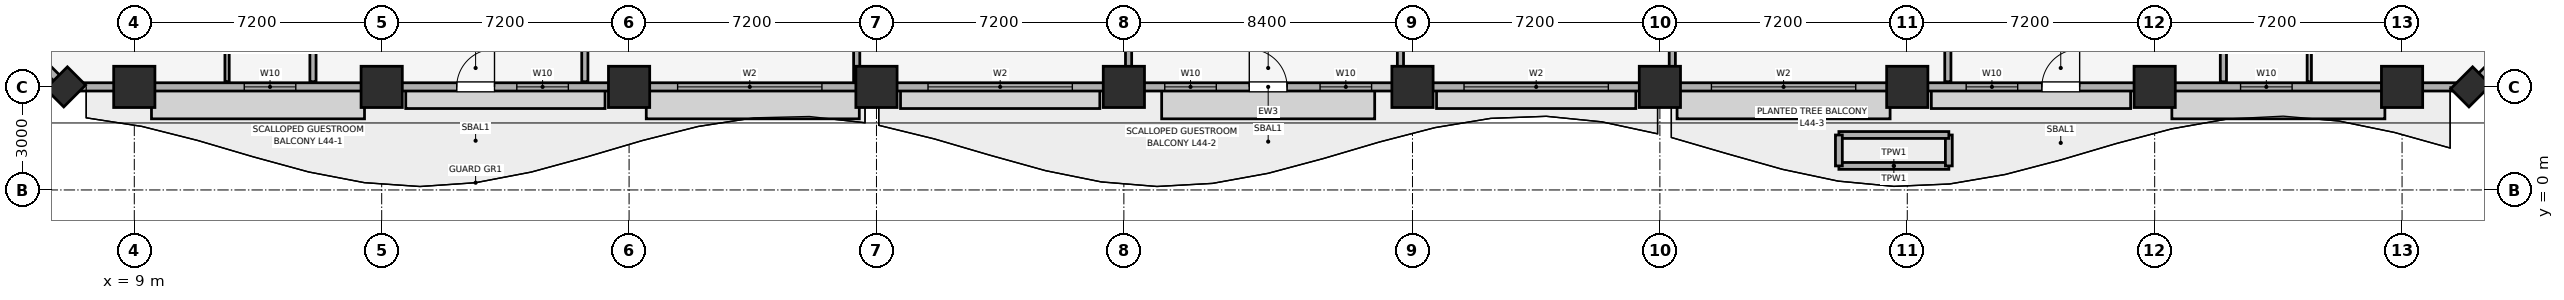
"""IFC4 building model, lengths in metres.
Left out: names, types, materials, properties, quantities, classifications, styles, units other than length and angle.
Written with IfcOpenShell. Run it as: python <this file> out.ifc"""

import sys

from ifc_helpers import new_model, si_unit, direction, frame, frame_2d, origin, origin_2d, place, context, subcontext, project, spatial, rectangle, extrude, element, fill, save


model = new_model("IFC4")
c1 = context("Model", 3, precision=1e-05, world=origin(), true_north=direction((0.0, 1.0)))
c2 = subcontext(c1, "Body", "Model", "MODEL_VIEW")
j1 = project(units=[si_unit("LENGTHUNIT", "METRE"), si_unit("PLANEANGLEUNIT", "RADIAN")], contexts=[c1])
p1 = place(None, origin())
s1 = spatial("IfcSite", under=j1, at=p1, CompositionType="ELEMENT")
p2 = place(p1, origin())
s2 = spatial("IfcBuilding", under=s1, at=p2, CompositionType="ELEMENT")
p3 = place(p2, frame((0.0, 0.0, 180.95)))
s3 = spatial("IfcBuildingStorey", under=s2, at=p3, CompositionType="ELEMENT", Elevation=180.95)
for number, where, z_axis, x_axis in (
    (1, (9.0, 3.0, 0.0), (0.0, 0.0, 1.0), (1.0, 0.0, 0.0)),
    (2, (16.2, 3.0, 0.0), (0.0, 0.0, 1.0), (1.0, 0.0, 0.0)),
    (3, (23.4, 3.0, 0.0), (0.0, 0.0, 1.0), (1.0, 0.0, 0.0)),
    (4, (30.6, 3.0, 0.0), (0.0, 0.0, 1.0), (1.0, 0.0, 0.0)),
    (5, (37.8, 3.0, 0.0), (0.0, 0.0, 1.0), (1.0, 0.0, 0.0)),
    (6, (46.2, 3.0, 0.0), (0.0, 0.0, 1.0), (1.0, 0.0, 0.0)),
    (7, (53.4, 3.0, 0.0), (0.0, 0.0, 1.0), (1.0, 0.0, 0.0)),
    (8, (60.6, 3.0, 0.0), (0.0, 0.0, 1.0), (1.0, 0.0, 0.0)),
    (9, (67.8, 3.0, 0.0), (0.0, 0.0, 1.0), (1.0, 0.0, 0.0)),
    (10, (75.0, 3.0, 0.0), (0.0, 0.0, 1.0), (1.0, 0.0, 0.0)),
):
    element("IfcColumn", number, at=place(p3, frame(where, z_axis=z_axis, x_axis=x_axis)), inside=s3, PredefinedType="COLUMN", context=c2, shape_type="SweptSolid", body=[
        extrude(rectangle(XDim=1.2, YDim=1.2, at=origin_2d()), origin(), (0.0, 0.0, 1.0), 3.45),
    ])
for number, where, z_axis, x_axis in (
    (11, (7.0, 3.0, 0.0), (0.0, 0.0, 1.0), (0.707, 0.707, 0.0)),
    (12, (77.0, 3.0, 0.0), (0.0, 0.0, 1.0), (0.707, 0.707, 0.0)),
):
    element("IfcColumn", number, at=place(p3, frame(where, z_axis=z_axis, x_axis=x_axis)), inside=s3, PredefinedType="PILASTER", context=c2, shape_type="SweptSolid", body=[
        extrude(rectangle(XDim=0.9, YDim=0.75, at=origin_2d()), origin(), (0.0, 0.0, 1.0), 3.45),
    ])
p4 = place(p3, frame((7.0, 3.0, 0.0), z_axis=(0.0, 0.0, 1.0), x_axis=(1.0, 0.0, 0.0)))
e13 = element("IfcWall", 13, at=p4, inside=s3, PredefinedType="SOLIDWALL", context=c2, shape_type="SweptSolid", body=[
    extrude(rectangle(XDim=70.0, YDim=0.24, at=frame_2d((35.0, 0.0))), origin(), (0.0, 0.0, 1.0), 2.65),
])
p5 = place(p4, frame((11.383, 0.0, 0.0)))
e14 = element("IfcOpeningElement", 14, at=p5, cuts=e13, PredefinedType="OPENING", context=c2, shape_type="SweptSolid", body=[
    extrude(rectangle(XDim=1.1, YDim=2.15, at=frame_2d((0.55, 1.075))), frame((0.0, 0.13, 0.0), z_axis=(0.0, -1.0, 0.0), x_axis=(1.0, 0.0, 0.0)), (0.0, 0.0, 1.0), 0.26),
])
p6 = place(p4, frame((34.45, 0.0, 0.0)))
e15 = element("IfcOpeningElement", 15, at=p6, cuts=e13, PredefinedType="OPENING", context=c2, shape_type="SweptSolid", body=[
    extrude(rectangle(XDim=1.1, YDim=2.15, at=frame_2d((0.55, 1.075))), frame((0.0, 0.13, 0.0), z_axis=(0.0, -1.0, 0.0), x_axis=(1.0, 0.0, 0.0)), (0.0, 0.0, 1.0), 0.26),
])
p7 = place(p4, frame((57.517, 0.0, 0.0)))
e16 = element("IfcOpeningElement", 16, at=p7, cuts=e13, PredefinedType="OPENING", context=c2, shape_type="SweptSolid", body=[
    extrude(rectangle(XDim=1.1, YDim=2.15, at=frame_2d((0.55, 1.075))), frame((0.0, 0.13, 0.0), z_axis=(0.0, -1.0, 0.0), x_axis=(1.0, 0.0, 0.0)), (0.0, 0.0, 1.0), 0.26),
])
p8 = place(p4, frame((5.2, 0.0, 0.85)))
e17 = element("IfcOpeningElement", 17, at=p8, cuts=e13, PredefinedType="OPENING", context=c2, shape_type="SweptSolid", body=[
    extrude(rectangle(XDim=1.5, YDim=1.4, at=frame_2d((0.75, 0.7))), frame((0.0, 0.13, 0.0), z_axis=(0.0, -1.0, 0.0), x_axis=(1.0, 0.0, 0.0)), (0.0, 0.0, 1.0), 0.26),
])
p9 = place(p4, frame((13.133, 0.0, 0.85)))
e18 = element("IfcOpeningElement", 18, at=p9, cuts=e13, PredefinedType="OPENING", context=c2, shape_type="SweptSolid", body=[
    extrude(rectangle(XDim=1.5, YDim=1.4, at=frame_2d((0.75, 0.7))), frame((0.0, 0.13, 0.0), z_axis=(0.0, -1.0, 0.0), x_axis=(1.0, 0.0, 0.0)), (0.0, 0.0, 1.0), 0.26),
])
p10 = place(p4, frame((17.812, 0.0, 0.85)))
e19 = element("IfcOpeningElement", 19, at=p10, cuts=e13, PredefinedType="OPENING", context=c2, shape_type="SweptSolid", body=[
    extrude(rectangle(XDim=4.2, YDim=1.65, at=frame_2d((2.1, 0.825))), frame((0.0, 0.13, 0.0), z_axis=(0.0, -1.0, 0.0), x_axis=(1.0, 0.0, 0.0)), (0.0, 0.0, 1.0), 0.26),
])
p11 = place(p4, frame((25.1, 0.0, 0.85)))
e20 = element("IfcOpeningElement", 20, at=p11, cuts=e13, PredefinedType="OPENING", context=c2, shape_type="SweptSolid", body=[
    extrude(rectangle(XDim=4.2, YDim=1.65, at=frame_2d((2.1, 0.825))), frame((0.0, 0.13, 0.0), z_axis=(0.0, -1.0, 0.0), x_axis=(1.0, 0.0, 0.0)), (0.0, 0.0, 1.0), 0.26),
])
p12 = place(p4, frame((31.99, 0.0, 0.85)))
e21 = element("IfcOpeningElement", 21, at=p12, cuts=e13, PredefinedType="OPENING", context=c2, shape_type="SweptSolid", body=[
    extrude(rectangle(XDim=1.5, YDim=1.4, at=frame_2d((0.75, 0.7))), frame((0.0, 0.13, 0.0), z_axis=(0.0, -1.0, 0.0), x_axis=(1.0, 0.0, 0.0)), (0.0, 0.0, 1.0), 0.26),
])
p13 = place(p4, frame((36.51, 0.0, 0.85)))
e22 = element("IfcOpeningElement", 22, at=p13, cuts=e13, PredefinedType="OPENING", context=c2, shape_type="SweptSolid", body=[
    extrude(rectangle(XDim=1.5, YDim=1.4, at=frame_2d((0.75, 0.7))), frame((0.0, 0.13, 0.0), z_axis=(0.0, -1.0, 0.0), x_axis=(1.0, 0.0, 0.0)), (0.0, 0.0, 1.0), 0.26),
])
p14 = place(p4, frame((40.7, 0.0, 0.85)))
e23 = element("IfcOpeningElement", 23, at=p14, cuts=e13, PredefinedType="OPENING", context=c2, shape_type="SweptSolid", body=[
    extrude(rectangle(XDim=4.2, YDim=1.65, at=frame_2d((2.1, 0.825))), frame((0.0, 0.13, 0.0), z_axis=(0.0, -1.0, 0.0), x_axis=(1.0, 0.0, 0.0)), (0.0, 0.0, 1.0), 0.26),
])
p15 = place(p4, frame((47.9, 0.0, 0.85)))
e24 = element("IfcOpeningElement", 24, at=p15, cuts=e13, PredefinedType="OPENING", context=c2, shape_type="SweptSolid", body=[
    extrude(rectangle(XDim=4.2, YDim=1.65, at=frame_2d((2.1, 0.825))), frame((0.0, 0.13, 0.0), z_axis=(0.0, -1.0, 0.0), x_axis=(1.0, 0.0, 0.0)), (0.0, 0.0, 1.0), 0.26),
])
p16 = place(p4, frame((55.314, 0.0, 0.85)))
e25 = element("IfcOpeningElement", 25, at=p16, cuts=e13, PredefinedType="OPENING", context=c2, shape_type="SweptSolid", body=[
    extrude(rectangle(XDim=1.5, YDim=1.4, at=frame_2d((0.75, 0.7))), frame((0.0, 0.13, 0.0), z_axis=(0.0, -1.0, 0.0), x_axis=(1.0, 0.0, 0.0)), (0.0, 0.0, 1.0), 0.26),
])
p17 = place(p4, frame((63.3, 0.0, 0.85)))
e26 = element("IfcOpeningElement", 26, at=p17, cuts=e13, PredefinedType="OPENING", context=c2, shape_type="SweptSolid", body=[
    extrude(rectangle(XDim=1.5, YDim=1.4, at=frame_2d((0.75, 0.7))), frame((0.0, 0.13, 0.0), z_axis=(0.0, -1.0, 0.0), x_axis=(1.0, 0.0, 0.0)), (0.0, 0.0, 1.0), 0.26),
])
p18 = place(p3, frame((77.0, 3.0, 0.0), z_axis=(0.0, 0.0, 1.0), x_axis=(0.707106781187, 0.707106781187, 0.0)))
e27 = element("IfcWall", 27, at=p18, inside=s3, PredefinedType="SOLIDWALL", context=c2, shape_type="SweptSolid", body=[
    extrude(rectangle(XDim=5.657, YDim=0.24, at=frame_2d((2.828, 0.0))), origin(), (0.0, 0.0, 1.0), 2.65),
])
p19 = place(p18, frame((1.778, 0.0, 0.85)))
e28 = element("IfcOpeningElement", 28, at=p19, cuts=e27, PredefinedType="OPENING", context=c2, shape_type="SweptSolid", body=[
    extrude(rectangle(XDim=2.1, YDim=1.6, at=frame_2d((1.05, 0.8))), frame((0.0, 0.13, 0.0), z_axis=(0.0, -1.0, 0.0), x_axis=(1.0, 0.0, 0.0)), (0.0, 0.0, 1.0), 0.26),
])
p20 = place(p3, frame((3.0, 7.0, 0.0), z_axis=(0.0, 0.0, 1.0), x_axis=(0.707106781187, -0.707106781187, 0.0)))
e29 = element("IfcWall", 29, at=p20, inside=s3, PredefinedType="SOLIDWALL", context=c2, shape_type="SweptSolid", body=[
    extrude(rectangle(XDim=5.657, YDim=0.24, at=frame_2d((2.828, 0.0))), origin(), (0.0, 0.0, 1.0), 2.65),
])
p21 = place(p20, frame((1.778, 0.0, 0.85)))
e30 = element("IfcOpeningElement", 30, at=p21, cuts=e29, PredefinedType="OPENING", context=c2, shape_type="SweptSolid", body=[
    extrude(rectangle(XDim=2.1, YDim=1.6, at=frame_2d((1.05, 0.8))), frame((0.0, 0.13, 0.0), z_axis=(0.0, -1.0, 0.0), x_axis=(1.0, 0.0, 0.0)), (0.0, 0.0, 1.0), 0.26),
])
p22 = place(p3, frame((58.61, 0.7, 0.0), z_axis=(0.0, 0.0, 1.0), x_axis=(1.0, 0.0, 0.0)))
e31 = element("IfcWall", 31, at=p22, inside=s3, PredefinedType="PARAPET", context=c2, shape_type="SweptSolid", body=[
    extrude(rectangle(XDim=3.2, YDim=0.2, at=frame_2d((1.6, 0.0))), origin(), (0.0, 0.0, 1.0), 0.55),
])
p23 = place(p3, frame((61.81, 0.7, 0.0), z_axis=(0.0, 0.0, 1.0), x_axis=(0.0, 1.0, 0.0)))
e32 = element("IfcWall", 32, at=p23, inside=s3, PredefinedType="PARAPET", context=c2, shape_type="SweptSolid", body=[
    extrude(rectangle(XDim=0.9, YDim=0.2, at=frame_2d((0.45, 0.0))), origin(), (0.0, 0.0, 1.0), 0.55),
])
p24 = place(p3, frame((61.81, 1.6, 0.0), z_axis=(0.0, 0.0, 1.0), x_axis=(-1.0, 0.0, 0.0)))
e33 = element("IfcWall", 33, at=p24, inside=s3, PredefinedType="PARAPET", context=c2, shape_type="SweptSolid", body=[
    extrude(rectangle(XDim=3.2, YDim=0.2, at=frame_2d((1.6, 0.0))), origin(), (0.0, 0.0, 1.0), 0.55),
])
p25 = place(p3, frame((58.61, 1.6, 0.0), z_axis=(0.0, 0.0, 1.0), x_axis=(0.0, -1.0, 0.0)))
e34 = element("IfcWall", 34, at=p25, inside=s3, PredefinedType="PARAPET", context=c2, shape_type="SweptSolid", body=[
    extrude(rectangle(XDim=0.9, YDim=0.2, at=frame_2d((0.45, 0.0))), origin(), (0.0, 0.0, 1.0), 0.55),
])
for number, where, z_axis, x_axis in (
    (35, (14.2, 3.15, 0.0), (0.0, 0.0, 1.0), (0.0, 1.0, 0.0)),
    (36, (22.112, 3.15, 0.0), (0.0, 0.0, 1.0), (0.0, 1.0, 0.0)),
    (37, (30.025, 3.15, 0.0), (0.0, 0.0, 1.0), (0.0, 1.0, 0.0)),
):
    element("IfcWall", number, at=place(p3, frame(where, z_axis=z_axis, x_axis=x_axis)), inside=s3, PredefinedType="PARTITIONING", context=c2, shape_type="SweptSolid", body=[
        extrude(rectangle(XDim=17.355, YDim=0.18, at=frame_2d((8.677, 0.0))), origin(), (0.0, 0.0, 1.0), 3.45),
    ])
p26 = place(p3, frame((37.937, 3.15, 0.0), z_axis=(0.0, 0.0, 1.0), x_axis=(0.0, 1.0, 0.0)))
e38 = element("IfcWall", 38, at=p26, inside=s3, PredefinedType="PARTITIONING", context=c2, shape_type="SweptSolid", body=[
    extrude(rectangle(XDim=17.355, YDim=0.18, at=frame_2d((8.677, 0.0))), origin(), (0.0, 0.0, 1.0), 2.85),
])
for number, where, z_axis, x_axis in (
    (39, (45.849, 3.15, 0.0), (0.0, 0.0, 1.0), (0.0, 1.0, 0.0)),
    (40, (53.761, 3.15, 0.0), (0.0, 0.0, 1.0), (0.0, 1.0, 0.0)),
    (41, (61.781, 3.15, 0.0), (0.0, 0.0, 1.0), (0.0, 1.0, 0.0)),
    (42, (69.8, 3.15, 0.0), (0.0, 0.0, 1.0), (0.0, 1.0, 0.0)),
):
    element("IfcWall", number, at=place(p3, frame(where, z_axis=z_axis, x_axis=x_axis)), inside=s3, PredefinedType="PARTITIONING", context=c2, shape_type="SweptSolid", body=[
        extrude(rectangle(XDim=17.355, YDim=0.18, at=frame_2d((8.677, 0.0))), origin(), (0.0, 0.0, 1.0), 3.45),
    ])
for number, where, z_axis, x_axis in (
    (43, (11.7, 3.15, 0.0), (0.0, 0.0, 1.0), (0.0, 1.0, 0.0)),
    (44, (72.3, 3.15, 0.0), (0.0, 0.0, 1.0), (0.0, 1.0, 0.0)),
):
    element("IfcWall", number, at=place(p3, frame(where, z_axis=z_axis, x_axis=x_axis)), inside=s3, PredefinedType="PARTITIONING", context=c2, shape_type="SweptSolid", body=[
        extrude(rectangle(XDim=2.483, YDim=0.125, at=frame_2d((1.241, 0.0))), origin(), (0.0, 0.0, 1.0), 3.45),
    ])
p27 = place(p5, origin())
e45 = element("IfcDoor", 45, at=p27, inside=s3, OperationType="SINGLE_SWING_RIGHT", PredefinedType="DOOR", context=c2, shape_type="SweptSolid", body=[
    extrude(rectangle(XDim=1.1, YDim=2.15, at=frame_2d((0.55, 1.075))), frame((0.0, 0.025, 0.0), z_axis=(0.0, -1.0, 0.0), x_axis=(1.0, 0.0, 0.0)), (0.0, 0.0, 1.0), 0.05),
])
fill(e14, e45)
p28 = place(p6, origin())
e46 = element("IfcDoor", 46, at=p28, inside=s3, OperationType="SINGLE_SWING_LEFT", PredefinedType="DOOR", context=c2, shape_type="SweptSolid", body=[
    extrude(rectangle(XDim=1.1, YDim=2.15, at=frame_2d((0.55, 1.075))), frame((0.0, 0.025, 0.0), z_axis=(0.0, -1.0, 0.0), x_axis=(1.0, 0.0, 0.0)), (0.0, 0.0, 1.0), 0.05),
])
fill(e15, e46)
p29 = place(p7, origin())
e47 = element("IfcDoor", 47, at=p29, inside=s3, OperationType="SINGLE_SWING_RIGHT", PredefinedType="DOOR", context=c2, shape_type="SweptSolid", body=[
    extrude(rectangle(XDim=1.1, YDim=2.15, at=frame_2d((0.55, 1.075))), frame((0.0, 0.025, 0.0), z_axis=(0.0, -1.0, 0.0), x_axis=(1.0, 0.0, 0.0)), (0.0, 0.0, 1.0), 0.05),
])
fill(e16, e47)
p30 = place(p8, origin())
e48 = element("IfcWindow", 48, at=p30, inside=s3, PartitioningType="SINGLE_PANEL", PredefinedType="WINDOW", context=c2, shape_type="SweptSolid", body=[
    extrude(rectangle(XDim=1.5, YDim=1.4, at=frame_2d((0.75, 0.7))), frame((0.0, 0.03, 0.0), z_axis=(0.0, -1.0, 0.0), x_axis=(1.0, 0.0, 0.0)), (0.0, 0.0, 1.0), 0.06),
])
fill(e17, e48)
p31 = place(p9, origin())
e49 = element("IfcWindow", 49, at=p31, inside=s3, PartitioningType="SINGLE_PANEL", PredefinedType="WINDOW", context=c2, shape_type="SweptSolid", body=[
    extrude(rectangle(XDim=1.5, YDim=1.4, at=frame_2d((0.75, 0.7))), frame((0.0, 0.03, 0.0), z_axis=(0.0, -1.0, 0.0), x_axis=(1.0, 0.0, 0.0)), (0.0, 0.0, 1.0), 0.06),
])
fill(e18, e49)
p32 = place(p10, origin())
e50 = element("IfcWindow", 50, at=p32, inside=s3, PartitioningType="SINGLE_PANEL", PredefinedType="WINDOW", context=c2, shape_type="SweptSolid", body=[
    extrude(rectangle(XDim=4.2, YDim=1.65, at=frame_2d((2.1, 0.825))), frame((0.0, 0.03, 0.0), z_axis=(0.0, -1.0, 0.0), x_axis=(1.0, 0.0, 0.0)), (0.0, 0.0, 1.0), 0.06),
])
fill(e19, e50)
p33 = place(p11, origin())
e51 = element("IfcWindow", 51, at=p33, inside=s3, PartitioningType="SINGLE_PANEL", PredefinedType="WINDOW", context=c2, shape_type="SweptSolid", body=[
    extrude(rectangle(XDim=4.2, YDim=1.65, at=frame_2d((2.1, 0.825))), frame((0.0, 0.03, 0.0), z_axis=(0.0, -1.0, 0.0), x_axis=(1.0, 0.0, 0.0)), (0.0, 0.0, 1.0), 0.06),
])
fill(e20, e51)
p34 = place(p12, origin())
e52 = element("IfcWindow", 52, at=p34, inside=s3, PartitioningType="SINGLE_PANEL", PredefinedType="WINDOW", context=c2, shape_type="SweptSolid", body=[
    extrude(rectangle(XDim=1.5, YDim=1.4, at=frame_2d((0.75, 0.7))), frame((0.0, 0.03, 0.0), z_axis=(0.0, -1.0, 0.0), x_axis=(1.0, 0.0, 0.0)), (0.0, 0.0, 1.0), 0.06),
])
fill(e21, e52)
p35 = place(p13, origin())
e53 = element("IfcWindow", 53, at=p35, inside=s3, PartitioningType="SINGLE_PANEL", PredefinedType="WINDOW", context=c2, shape_type="SweptSolid", body=[
    extrude(rectangle(XDim=1.5, YDim=1.4, at=frame_2d((0.75, 0.7))), frame((0.0, 0.03, 0.0), z_axis=(0.0, -1.0, 0.0), x_axis=(1.0, 0.0, 0.0)), (0.0, 0.0, 1.0), 0.06),
])
fill(e22, e53)
p36 = place(p14, origin())
e54 = element("IfcWindow", 54, at=p36, inside=s3, PartitioningType="SINGLE_PANEL", PredefinedType="WINDOW", context=c2, shape_type="SweptSolid", body=[
    extrude(rectangle(XDim=4.2, YDim=1.65, at=frame_2d((2.1, 0.825))), frame((0.0, 0.03, 0.0), z_axis=(0.0, -1.0, 0.0), x_axis=(1.0, 0.0, 0.0)), (0.0, 0.0, 1.0), 0.06),
])
fill(e23, e54)
p37 = place(p15, origin())
e55 = element("IfcWindow", 55, at=p37, inside=s3, PartitioningType="SINGLE_PANEL", PredefinedType="WINDOW", context=c2, shape_type="SweptSolid", body=[
    extrude(rectangle(XDim=4.2, YDim=1.65, at=frame_2d((2.1, 0.825))), frame((0.0, 0.03, 0.0), z_axis=(0.0, -1.0, 0.0), x_axis=(1.0, 0.0, 0.0)), (0.0, 0.0, 1.0), 0.06),
])
fill(e24, e55)
p38 = place(p16, origin())
e56 = element("IfcWindow", 56, at=p38, inside=s3, PartitioningType="SINGLE_PANEL", PredefinedType="WINDOW", context=c2, shape_type="SweptSolid", body=[
    extrude(rectangle(XDim=1.5, YDim=1.4, at=frame_2d((0.75, 0.7))), frame((0.0, 0.03, 0.0), z_axis=(0.0, -1.0, 0.0), x_axis=(1.0, 0.0, 0.0)), (0.0, 0.0, 1.0), 0.06),
])
fill(e25, e56)
p39 = place(p17, origin())
e57 = element("IfcWindow", 57, at=p39, inside=s3, PartitioningType="SINGLE_PANEL", PredefinedType="WINDOW", context=c2, shape_type="SweptSolid", body=[
    extrude(rectangle(XDim=1.5, YDim=1.4, at=frame_2d((0.75, 0.7))), frame((0.0, 0.03, 0.0), z_axis=(0.0, -1.0, 0.0), x_axis=(1.0, 0.0, 0.0)), (0.0, 0.0, 1.0), 0.06),
])
fill(e26, e57)
save(model, sys.argv[1])
